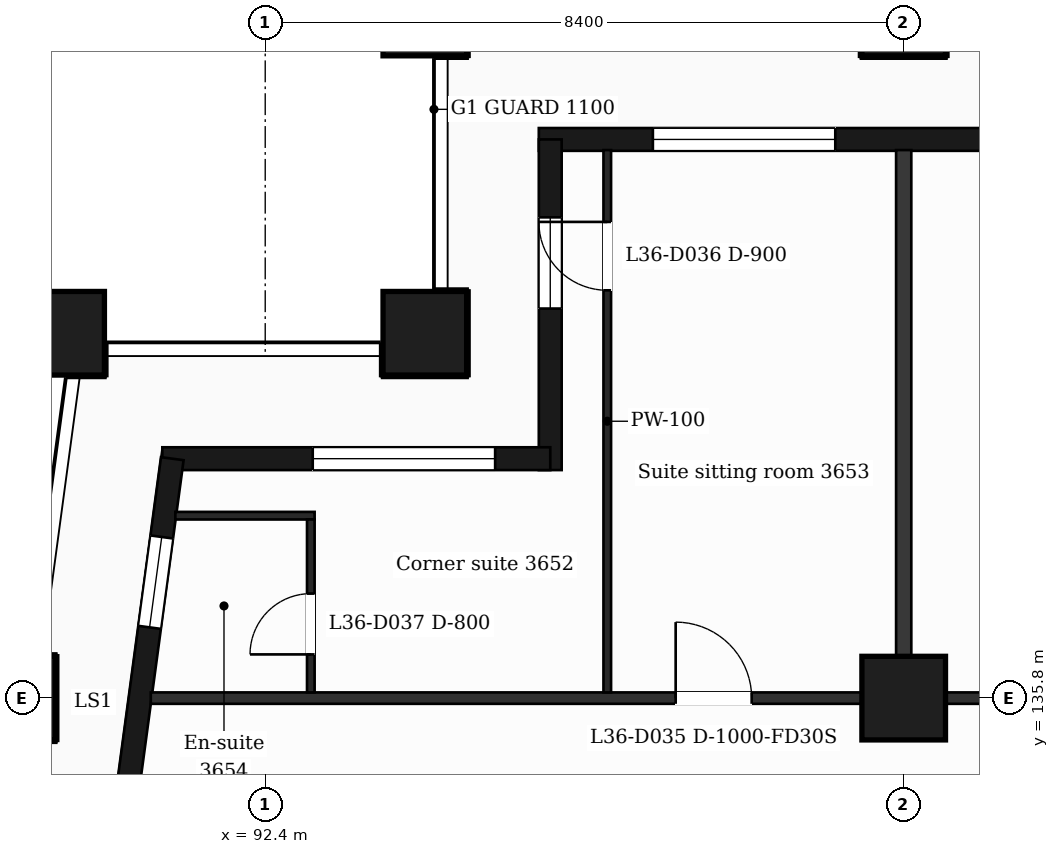
"""IFC4 building model, lengths in metres.
Left out: names, types, materials, properties, quantities, classifications, styles, units other than length and angle.
Written with IfcOpenShell. Run it as: python <this file> out.ifc"""

import sys

from ifc_helpers import new_model, si_unit, direction, frame, frame_2d, origin, origin_2d, place, context, subcontext, project, spatial, rectangle, extrude, element, fill, save


model = new_model("IFC4")
c1 = context("Model", 3, precision=1e-05, world=origin(), true_north=direction((0.0, 1.0)))
c2 = subcontext(c1, "Body", "Model", "MODEL_VIEW")
j1 = project(units=[si_unit("LENGTHUNIT", "METRE"), si_unit("PLANEANGLEUNIT", "RADIAN")], contexts=[c1])
p1 = place(None, origin())
s1 = spatial("IfcSite", under=j1, at=p1, CompositionType="ELEMENT")
p2 = place(p1, origin())
s2 = spatial("IfcBuilding", under=s1, at=p2, CompositionType="ELEMENT")
p3 = place(p2, frame((0.0, 0.0, 155.2)))
s3 = spatial("IfcBuildingStorey", under=s2, at=p3, CompositionType="ELEMENT", Elevation=155.2)
for number, where, z_axis, x_axis in (
    (1, (94.5, 140.6, 0.0), (0.0, 0.0, 1.0), (1.0, 0.0, 0.0)),
    (2, (89.735, 140.6, 0.0), (0.0, 0.0, 1.0), (1.0, 0.0, 0.0)),
    (3, (100.8, 135.8, 0.0), (0.0, 0.0, 1.0), (1.0, 0.0, 0.0)),
    (4, (89.088, 135.8, 0.0), (0.0, 0.0, 1.0), (1.0, 0.0, 0.0)),
    (5, (100.8, 144.8, 0.0), (0.0, 0.0, 1.0), (1.0, 0.0, 0.0)),
    (6, (94.5, 144.8, 0.0), (0.0, 0.0, 1.0), (1.0, 0.0, 0.0)),
):
    element("IfcColumn", number, at=place(p3, frame(where, z_axis=z_axis, x_axis=x_axis)), inside=s3, PredefinedType="COLUMN", context=c2, shape_type="SweptSolid", body=[
        extrude(rectangle(XDim=1.1, YDim=1.1, at=origin_2d()), origin(), (0.0, 0.0, 1.0), 3.7),
    ])
p4 = place(p3, frame((110.4, 143.15, 0.0), z_axis=(0.0, 0.0, 1.0), x_axis=(-1.0, 0.0, 0.0)))
e7 = element("IfcWall", 7, at=p4, inside=s3, PredefinedType="SOLIDWALL", context=c2, shape_type="SweptSolid", body=[
    extrude(rectangle(XDim=14.4, YDim=0.3, at=frame_2d((7.2, 0.0))), origin(), (0.0, 0.0, 1.0), 3.38),
])
p5 = place(p4, frame((2.7, 0.0, 0.9)))
e8 = element("IfcOpeningElement", 8, at=p5, cuts=e7, PredefinedType="OPENING", context=c2, shape_type="SweptSolid", body=[
    extrude(rectangle(XDim=1.2, YDim=2.1, at=frame_2d((0.6, 1.05))), frame((0.0, 0.16, 0.0), z_axis=(0.0, -1.0, 0.0), x_axis=(1.0, 0.0, 0.0)), (0.0, 0.0, 1.0), 0.32),
])
p6 = place(p4, frame((6.9, 0.0, 0.0)))
e9 = element("IfcOpeningElement", 9, at=p6, cuts=e7, PredefinedType="OPENING", context=c2, shape_type="SweptSolid", body=[
    extrude(rectangle(XDim=1.2, YDim=2.4, at=frame_2d((0.6, 1.2))), frame((0.0, 0.16, 0.0), z_axis=(0.0, -1.0, 0.0), x_axis=(1.0, 0.0, 0.0)), (0.0, 0.0, 1.0), 0.32),
])
p7 = place(p4, frame((10.5, 0.0, 0.9)))
e10 = element("IfcOpeningElement", 10, at=p7, cuts=e7, PredefinedType="OPENING", context=c2, shape_type="SweptSolid", body=[
    extrude(rectangle(XDim=2.4, YDim=2.1, at=frame_2d((1.2, 1.05))), frame((0.0, 0.16, 0.0), z_axis=(0.0, -1.0, 0.0), x_axis=(1.0, 0.0, 0.0)), (0.0, 0.0, 1.0), 0.32),
])
p8 = place(p3, frame((96.15, 143.15, 0.0), z_axis=(0.0, 0.0, 1.0), x_axis=(0.0, -1.0, 0.0)))
e11 = element("IfcWall", 11, at=p8, inside=s3, PredefinedType="SOLIDWALL", context=c2, shape_type="SweptSolid", body=[
    extrude(rectangle(XDim=4.35, YDim=0.3, at=frame_2d((2.175, 0.0))), origin(), (0.0, 0.0, 1.0), 3.38),
])
p9 = place(p8, frame((1.025, 0.0, 0.9)))
e12 = element("IfcOpeningElement", 12, at=p9, cuts=e11, PredefinedType="OPENING", context=c2, shape_type="SweptSolid", body=[
    extrude(rectangle(XDim=1.2, YDim=2.1, at=frame_2d((0.6, 1.05))), frame((0.0, 0.16, 0.0), z_axis=(0.0, -1.0, 0.0), x_axis=(1.0, 0.0, 0.0)), (0.0, 0.0, 1.0), 0.32),
])
p10 = place(p3, frame((96.15, 138.95, 0.0), z_axis=(0.0, 0.0, 1.0), x_axis=(-1.0, 0.0, 0.0)))
e13 = element("IfcWall", 13, at=p10, inside=s3, PredefinedType="SOLIDWALL", context=c2, shape_type="SweptSolid", body=[
    extrude(rectangle(XDim=5.104, YDim=0.3, at=frame_2d((2.552, 0.0))), origin(), (0.0, 0.0, 1.0), 3.38),
])
p11 = place(p10, frame((0.725, 0.0, 0.9)))
e14 = element("IfcOpeningElement", 14, at=p11, cuts=e13, PredefinedType="OPENING", context=c2, shape_type="SweptSolid", body=[
    extrude(rectangle(XDim=2.4, YDim=2.1, at=frame_2d((1.2, 1.05))), frame((0.0, 0.16, 0.0), z_axis=(0.0, -1.0, 0.0), x_axis=(1.0, 0.0, 0.0)), (0.0, 0.0, 1.0), 0.32),
])
p12 = place(p3, frame((91.177, 138.95, 0.0), z_axis=(0.0, 0.0, 1.0), x_axis=(-0.133426664613, -0.991058689065, 0.0)))
e15 = element("IfcWall", 15, at=p12, inside=s3, PredefinedType="SOLIDWALL", context=c2, shape_type="SweptSolid", body=[
    extrude(rectangle(XDim=6.609, YDim=0.3, at=frame_2d((3.305, 0.0))), origin(), (0.0, 0.0, 1.0), 3.38),
])
p13 = place(p12, frame((1.039, 0.0, 0.9)))
e16 = element("IfcOpeningElement", 16, at=p13, cuts=e15, PredefinedType="OPENING", context=c2, shape_type="SweptSolid", body=[
    extrude(rectangle(XDim=1.2, YDim=2.1, at=frame_2d((0.6, 1.05))), frame((0.0, 0.16, 0.0), z_axis=(0.0, -1.0, 0.0), x_axis=(1.0, 0.0, 0.0)), (0.0, 0.0, 1.0), 0.32),
])
p14 = place(p12, frame((4.294, 0.0, 0.0)))
e17 = element("IfcOpeningElement", 17, at=p14, cuts=e15, PredefinedType="OPENING", context=c2, shape_type="SweptSolid", body=[
    extrude(rectangle(XDim=1.2, YDim=2.4, at=frame_2d((0.6, 1.2))), frame((0.0, 0.16, 0.0), z_axis=(0.0, -1.0, 0.0), x_axis=(1.0, 0.0, 0.0)), (0.0, 0.0, 1.0), 0.32),
])
p15 = place(p3, frame((90.895, 135.8, 0.0), z_axis=(0.0, 0.0, 1.0), x_axis=(1.0, 0.0, 0.0)))
e18 = element("IfcWall", 18, at=p15, inside=s3, PredefinedType="PARTITIONING", context=c2, shape_type="SweptSolid", body=[
    extrude(rectangle(XDim=45.011, YDim=0.15, at=frame_2d((22.505, 0.0))), origin(), (0.0, 0.0, 1.0), 3.38),
])
p16 = place(p15, frame((6.906, 0.0, 0.0)))
e19 = element("IfcOpeningElement", 19, at=p16, cuts=e18, PredefinedType="OPENING", context=c2, shape_type="SweptSolid", body=[
    extrude(rectangle(XDim=1.0, YDim=2.1, at=frame_2d((0.5, 1.05))), frame((0.0, 0.085, 0.0), z_axis=(0.0, -1.0, 0.0), x_axis=(1.0, 0.0, 0.0)), (0.0, 0.0, 1.0), 0.17),
])
p17 = place(p15, frame((12.935, 0.0, 0.0)))
e20 = element("IfcOpeningElement", 20, at=p17, cuts=e18, PredefinedType="OPENING", context=c2, shape_type="SweptSolid", body=[
    extrude(rectangle(XDim=1.0, YDim=2.1, at=frame_2d((0.5, 1.05))), frame((0.0, 0.085, 0.0), z_axis=(0.0, -1.0, 0.0), x_axis=(1.0, 0.0, 0.0)), (0.0, 0.0, 1.0), 0.17),
])
p18 = place(p15, frame((27.477, 0.0, 0.0)))
e21 = element("IfcOpeningElement", 21, at=p18, cuts=e18, PredefinedType="OPENING", context=c2, shape_type="SweptSolid", body=[
    extrude(rectangle(XDim=0.95, YDim=2.1, at=frame_2d((0.475, 1.05))), frame((0.0, 0.085, 0.0), z_axis=(0.0, -1.0, 0.0), x_axis=(1.0, 0.0, 0.0)), (0.0, 0.0, 1.0), 0.17),
])
p19 = place(p15, frame((31.555, 0.0, 0.0)))
e22 = element("IfcOpeningElement", 22, at=p19, cuts=e18, PredefinedType="OPENING", context=c2, shape_type="SweptSolid", body=[
    extrude(rectangle(XDim=0.95, YDim=2.1, at=frame_2d((0.475, 1.05))), frame((0.0, 0.085, 0.0), z_axis=(0.0, -1.0, 0.0), x_axis=(1.0, 0.0, 0.0)), (0.0, 0.0, 1.0), 0.17),
])
p20 = place(p15, frame((39.814, 0.0, 0.0)))
e23 = element("IfcOpeningElement", 23, at=p20, cuts=e18, PredefinedType="OPENING", context=c2, shape_type="SweptSolid", body=[
    extrude(rectangle(XDim=0.95, YDim=2.1, at=frame_2d((0.475, 1.05))), frame((0.0, 0.085, 0.0), z_axis=(0.0, -1.0, 0.0), x_axis=(1.0, 0.0, 0.0)), (0.0, 0.0, 1.0), 0.17),
])
p21 = place(p3, frame((91.218, 138.2, 0.0), z_axis=(0.0, 0.0, 1.0), x_axis=(1.0, 0.0, 0.0)))
e24 = element("IfcWall", 24, at=p21, inside=s3, PredefinedType="PARTITIONING", context=c2, shape_type="SweptSolid", body=[
    extrude(rectangle(XDim=1.832, YDim=0.1, at=frame_2d((0.916, 0.0))), origin(), (0.0, 0.0, 1.0), 3.38),
])
p22 = place(p3, frame((93.0, 135.875, 0.0), z_axis=(0.0, 0.0, 1.0), x_axis=(0.0, 1.0, 0.0)))
e25 = element("IfcWall", 25, at=p22, inside=s3, PredefinedType="PARTITIONING", context=c2, shape_type="SweptSolid", body=[
    extrude(rectangle(XDim=2.275, YDim=0.1, at=frame_2d((1.137, 0.0))), origin(), (0.0, 0.0, 1.0), 3.38),
])
p23 = place(p22, frame((0.5, 0.0, 0.0)))
e26 = element("IfcOpeningElement", 26, at=p23, cuts=e25, PredefinedType="OPENING", context=c2, shape_type="SweptSolid", body=[
    extrude(rectangle(XDim=0.8, YDim=2.1, at=frame_2d((0.4, 1.05))), frame((0.0, 0.06, 0.0), z_axis=(0.0, -1.0, 0.0), x_axis=(1.0, 0.0, 0.0)), (0.0, 0.0, 1.0), 0.12),
])
p24 = place(p3, frame((96.9, 135.875, 0.0), z_axis=(0.0, 0.0, 1.0), x_axis=(0.0, 1.0, 0.0)))
e27 = element("IfcWall", 27, at=p24, inside=s3, PredefinedType="PARTITIONING", context=c2, shape_type="SweptSolid", body=[
    extrude(rectangle(XDim=7.135, YDim=0.1, at=frame_2d((3.567, 0.0))), origin(), (0.0, 0.0, 1.0), 3.38),
])
p25 = place(p24, frame((5.29, 0.0, 0.0)))
e28 = element("IfcOpeningElement", 28, at=p25, cuts=e27, PredefinedType="OPENING", context=c2, shape_type="SweptSolid", body=[
    extrude(rectangle(XDim=0.9, YDim=2.1, at=frame_2d((0.45, 1.05))), frame((0.0, 0.06, 0.0), z_axis=(0.0, -1.0, 0.0), x_axis=(1.0, 0.0, 0.0)), (0.0, 0.0, 1.0), 0.12),
])
p26 = place(p3, frame((100.8, 135.875, 0.0), z_axis=(0.0, 0.0, 1.0), x_axis=(0.0, 1.0, 0.0)))
e29 = element("IfcWall", 29, at=p26, inside=s3, PredefinedType="PARTITIONING", context=c2, shape_type="SweptSolid", body=[
    extrude(rectangle(XDim=7.135, YDim=0.2, at=frame_2d((3.567, 0.0))), origin(), (0.0, 0.0, 1.0), 3.38),
])
p27 = place(p7, origin())
e30 = element("IfcWindow", 30, at=p27, inside=s3, PartitioningType="SINGLE_PANEL", PredefinedType="WINDOW", context=c2, shape_type="SweptSolid", body=[
    extrude(rectangle(XDim=2.4, YDim=2.1, at=frame_2d((1.2, 1.05))), frame((0.0, 0.03, 0.0), z_axis=(0.0, -1.0, 0.0), x_axis=(1.0, 0.0, 0.0)), (0.0, 0.0, 1.0), 0.06),
])
fill(e10, e30)
p28 = place(p9, origin())
e31 = element("IfcWindow", 31, at=p28, inside=s3, PartitioningType="SINGLE_PANEL", PredefinedType="WINDOW", context=c2, shape_type="SweptSolid", body=[
    extrude(rectangle(XDim=1.2, YDim=2.1, at=frame_2d((0.6, 1.05))), frame((0.0, 0.03, 0.0), z_axis=(0.0, -1.0, 0.0), x_axis=(1.0, 0.0, 0.0)), (0.0, 0.0, 1.0), 0.06),
])
fill(e12, e31)
p29 = place(p11, origin())
e32 = element("IfcWindow", 32, at=p29, inside=s3, PartitioningType="SINGLE_PANEL", PredefinedType="WINDOW", context=c2, shape_type="SweptSolid", body=[
    extrude(rectangle(XDim=2.4, YDim=2.1, at=frame_2d((1.2, 1.05))), frame((0.0, 0.03, 0.0), z_axis=(0.0, -1.0, 0.0), x_axis=(1.0, 0.0, 0.0)), (0.0, 0.0, 1.0), 0.06),
])
fill(e14, e32)
p30 = place(p13, origin())
e33 = element("IfcWindow", 33, at=p30, inside=s3, PartitioningType="SINGLE_PANEL", PredefinedType="WINDOW", context=c2, shape_type="SweptSolid", body=[
    extrude(rectangle(XDim=1.2, YDim=2.1, at=frame_2d((0.6, 1.05))), frame((0.0, 0.03, 0.0), z_axis=(0.0, -1.0, 0.0), x_axis=(1.0, 0.0, 0.0)), (0.0, 0.0, 1.0), 0.06),
])
fill(e16, e33)
p31 = place(p16, origin())
e34 = element("IfcDoor", 34, at=p31, inside=s3, OperationType="SINGLE_SWING_LEFT", PredefinedType="DOOR", context=c2, shape_type="SweptSolid", body=[
    extrude(rectangle(XDim=1.0, YDim=2.1, at=frame_2d((0.5, 1.05))), frame((0.0, 0.025, 0.0), z_axis=(0.0, -1.0, 0.0), x_axis=(1.0, 0.0, 0.0)), (0.0, 0.0, 1.0), 0.05),
])
fill(e19, e34)
p32 = place(p25, origin())
e35 = element("IfcDoor", 35, at=p32, inside=s3, OperationType="SINGLE_SWING_RIGHT", PredefinedType="DOOR", context=c2, shape_type="SweptSolid", body=[
    extrude(rectangle(XDim=0.9, YDim=2.1, at=frame_2d((0.45, 1.05))), frame((0.0, 0.025, 0.0), z_axis=(0.0, -1.0, 0.0), x_axis=(1.0, 0.0, 0.0)), (0.0, 0.0, 1.0), 0.05),
])
fill(e28, e35)
p33 = place(p23, origin())
e36 = element("IfcDoor", 36, at=p33, inside=s3, OperationType="SINGLE_SWING_LEFT", PredefinedType="DOOR", context=c2, shape_type="SweptSolid", body=[
    extrude(rectangle(XDim=0.8, YDim=2.1, at=frame_2d((0.4, 1.05))), frame((0.0, 0.025, 0.0), z_axis=(0.0, -1.0, 0.0), x_axis=(1.0, 0.0, 0.0)), (0.0, 0.0, 1.0), 0.05),
])
fill(e26, e36)
save(model, sys.argv[1])
